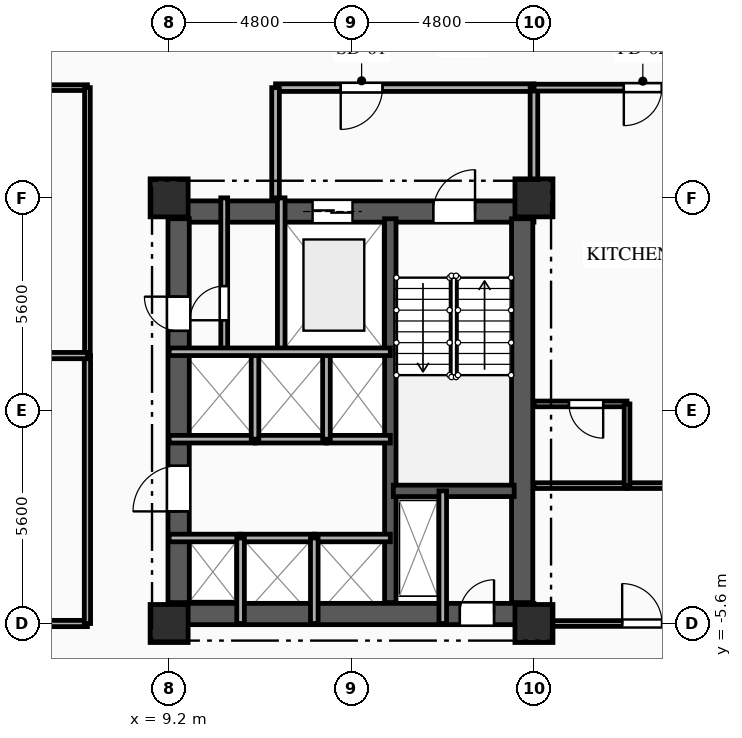
"""IFC4 building model, lengths in metres.
Left out: names, types, materials, properties, quantities, classifications, styles, units other than length and angle.
Written with IfcOpenShell. Run it as: python <this file> out.ifc"""

import sys

from ifc_helpers import new_model, si_unit, direction, frame, frame_2d, origin, origin_2d, place, context, subcontext, project, spatial, rectangle, extrude, element, fill, save


model = new_model("IFC4")
c1 = context("Model", 3, precision=1e-05, world=origin(), true_north=direction((0.0, 1.0)))
c2 = subcontext(c1, "Body", "Model", "MODEL_VIEW")
j1 = project(units=[si_unit("LENGTHUNIT", "METRE"), si_unit("PLANEANGLEUNIT", "RADIAN")], contexts=[c1])
p1 = place(None, origin())
s1 = spatial("IfcSite", under=j1, at=p1, CompositionType="ELEMENT")
p2 = place(p1, origin())
s2 = spatial("IfcBuilding", under=s1, at=p2, CompositionType="ELEMENT")
p3 = place(p2, frame((0.0, 0.0, 95.75)))
s3 = spatial("IfcBuildingStorey", under=s2, at=p3, CompositionType="ELEMENT", Elevation=95.75)
for number, where, z_axis, x_axis in (
    (1, (9.2, -5.6, 0.0), (0.0, 0.0, 1.0), (1.0, 0.0, 0.0)),
    (2, (9.2, 5.6, 0.0), (0.0, 0.0, 1.0), (1.0, 0.0, 0.0)),
    (3, (18.8, -5.6, 0.0), (0.0, 0.0, 1.0), (1.0, 0.0, 0.0)),
    (4, (18.8, 5.6, 0.0), (0.0, 0.0, 1.0), (1.0, 0.0, 0.0)),
):
    element("IfcColumn", number, at=place(p3, frame(where, z_axis=z_axis, x_axis=x_axis)), inside=s3, PredefinedType="COLUMN", context=c2, shape_type="SweptSolid", body=[
        extrude(rectangle(XDim=1.0, YDim=1.0, at=origin_2d()), origin(), (0.0, 0.0, 1.0), 3.35),
    ])
p4 = place(p3, frame((9.2, 5.24, 0.0), z_axis=(0.0, 0.0, 1.0), x_axis=(1.0, 0.0, 0.0)))
e5 = element("IfcWall", 5, at=p4, inside=s3, PredefinedType="SHEAR", context=c2, shape_type="SweptSolid", body=[
    extrude(rectangle(XDim=9.6, YDim=0.56, at=frame_2d((4.8, 0.0))), origin(), (0.0, 0.0, 1.0), 3.045),
])
p5 = place(p4, frame((6.95, 0.0, 0.0)))
e6 = element("IfcOpeningElement", 6, at=p5, cuts=e5, PredefinedType="OPENING", context=c2, shape_type="SweptSolid", body=[
    extrude(rectangle(XDim=1.1, YDim=2.15, at=frame_2d((0.55, 1.075))), frame((0.0, 0.29, 0.0), z_axis=(0.0, -1.0, 0.0), x_axis=(1.0, 0.0, 0.0)), (0.0, 0.0, 1.0), 0.58),
])
p6 = place(p4, frame((3.775, 0.0, 0.0)))
e7 = element("IfcOpeningElement", 7, at=p6, cuts=e5, PredefinedType="OPENING", context=c2, shape_type="SweptSolid", body=[
    extrude(rectangle(XDim=1.05, YDim=2.1, at=frame_2d((0.525, 1.05))), frame((0.0, 0.29, 0.0), z_axis=(0.0, -1.0, 0.0), x_axis=(1.0, 0.0, 0.0)), (0.0, 0.0, 1.0), 0.58),
])
p7 = place(p3, frame((9.2, -5.35, 0.0), z_axis=(0.0, 0.0, 1.0), x_axis=(1.0, 0.0, 0.0)))
e8 = element("IfcWall", 8, at=p7, inside=s3, PredefinedType="SHEAR", context=c2, shape_type="SweptSolid", body=[
    extrude(rectangle(XDim=9.6, YDim=0.56, at=frame_2d((4.8, 0.0))), origin(), (0.0, 0.0, 1.0), 3.045),
])
p8 = place(p7, frame((7.65, 0.0, 0.0)))
e9 = element("IfcOpeningElement", 9, at=p8, cuts=e8, PredefinedType="OPENING", context=c2, shape_type="SweptSolid", body=[
    extrude(rectangle(XDim=0.9, YDim=2.1, at=frame_2d((0.45, 1.05))), frame((0.0, 0.29, 0.0), z_axis=(0.0, -1.0, 0.0), x_axis=(1.0, 0.0, 0.0)), (0.0, 0.0, 1.0), 0.58),
])
p9 = place(p3, frame((9.45, -5.05, 0.0), z_axis=(0.0, 0.0, 1.0), x_axis=(0.0, 1.0, 0.0)))
e10 = element("IfcWall", 10, at=p9, inside=s3, PredefinedType="SHEAR", context=c2, shape_type="SweptSolid", body=[
    extrude(rectangle(XDim=10.1, YDim=0.56, at=frame_2d((5.05, 0.0))), origin(), (0.0, 0.0, 1.0), 3.045),
])
p10 = place(p9, frame((7.15, 0.0, 0.0)))
e11 = element("IfcOpeningElement", 11, at=p10, cuts=e10, PredefinedType="OPENING", context=c2, shape_type="SweptSolid", body=[
    extrude(rectangle(XDim=0.9, YDim=2.1, at=frame_2d((0.45, 1.05))), frame((0.0, 0.29, 0.0), z_axis=(0.0, -1.0, 0.0), x_axis=(1.0, 0.0, 0.0)), (0.0, 0.0, 1.0), 0.58),
])
p11 = place(p9, frame((2.4, 0.0, 0.0)))
e12 = element("IfcOpeningElement", 12, at=p11, cuts=e10, PredefinedType="OPENING", context=c2, shape_type="SweptSolid", body=[
    extrude(rectangle(XDim=1.2, YDim=2.15, at=frame_2d((0.6, 1.075))), frame((0.0, 0.29, 0.0), z_axis=(0.0, -1.0, 0.0), x_axis=(1.0, 0.0, 0.0)), (0.0, 0.0, 1.0), 0.58),
])
p12 = place(p3, frame((18.49, -5.05, 0.0), z_axis=(0.0, 0.0, 1.0), x_axis=(0.0, 1.0, 0.0)))
e13 = element("IfcWall", 13, at=p12, inside=s3, PredefinedType="SHEAR", context=c2, shape_type="SweptSolid", body=[
    extrude(rectangle(XDim=10.1, YDim=0.56, at=frame_2d((5.05, 0.0))), origin(), (0.0, 0.0, 1.0), 3.045),
])
p13 = place(p3, frame((15.02, -5.05, 0.0), z_axis=(0.0, 0.0, 1.0), x_axis=(0.0, 1.0, 0.0)))
e14 = element("IfcWall", 14, at=p13, inside=s3, PredefinedType="SHEAR", context=c2, shape_type="SweptSolid", body=[
    extrude(rectangle(XDim=10.1, YDim=0.3, at=frame_2d((5.05, 0.0))), origin(), (0.0, 0.0, 1.0), 3.045),
])
p14 = place(p3, frame((15.1, -2.11, 0.0), z_axis=(0.0, 0.0, 1.0), x_axis=(1.0, 0.0, 0.0)))
e15 = element("IfcWall", 15, at=p14, inside=s3, PredefinedType="SHEAR", context=c2, shape_type="SweptSolid", body=[
    extrude(rectangle(XDim=3.18, YDim=0.3, at=frame_2d((1.59, 0.0))), origin(), (0.0, 0.0, 1.0), 3.045),
])
p15 = place(p3, frame((16.4, -2.11, 0.0), z_axis=(0.0, 0.0, 1.0), x_axis=(0.0, -1.0, 0.0)))
e16 = element("IfcWall", 16, at=p15, inside=s3, PredefinedType="PARTITIONING", context=c2, shape_type="SweptSolid", body=[
    extrude(rectangle(XDim=3.49, YDim=0.2, at=frame_2d((1.745, 0.0))), origin(), (0.0, 0.0, 1.0), 3.045),
])
p16 = place(p3, frame((12.15, 5.6, 0.0), z_axis=(0.0, 0.0, 1.0), x_axis=(0.0, -1.0, 0.0)))
e17 = element("IfcWall", 17, at=p16, inside=s3, PredefinedType="PARTITIONING", context=c2, shape_type="SweptSolid", body=[
    extrude(rectangle(XDim=4.05, YDim=0.2, at=frame_2d((2.025, 0.0))), origin(), (0.0, 0.0, 1.0), 3.045),
])
p17 = place(p3, frame((18.8, 8.5, 0.0), z_axis=(0.0, 0.0, 1.0), x_axis=(-1.0, 0.0, 0.0)))
e18 = element("IfcWall", 18, at=p17, inside=s3, PredefinedType="PARTITIONING", context=c2, shape_type="SweptSolid", body=[
    extrude(rectangle(XDim=6.8, YDim=0.2, at=frame_2d((3.4, 0.0))), origin(), (0.0, 0.0, 1.0), 3.045),
])
p18 = place(p17, frame((3.985, 0.0, 0.0)))
e19 = element("IfcOpeningElement", 19, at=p18, cuts=e18, PredefinedType="OPENING", context=c2, shape_type="SweptSolid", body=[
    extrude(rectangle(XDim=1.1, YDim=2.15, at=frame_2d((0.55, 1.075))), frame((0.0, 0.11, 0.0), z_axis=(0.0, -1.0, 0.0), x_axis=(1.0, 0.0, 0.0)), (0.0, 0.0, 1.0), 0.22),
])
p19 = place(p3, frame((12.0, 8.5, 0.0), z_axis=(0.0, 0.0, 1.0), x_axis=(0.0, -1.0, 0.0)))
e20 = element("IfcWall", 20, at=p19, inside=s3, PredefinedType="PARTITIONING", context=c2, shape_type="SweptSolid", body=[
    extrude(rectangle(XDim=2.9, YDim=0.2, at=frame_2d((1.45, 0.0))), origin(), (0.0, 0.0, 1.0), 3.045),
])
p20 = place(p3, frame((18.8, 5.6, 0.0), z_axis=(0.0, 0.0, 1.0), x_axis=(0.0, 1.0, 0.0)))
e21 = element("IfcWall", 21, at=p20, inside=s3, PredefinedType="PARTITIONING", context=c2, shape_type="SweptSolid", body=[
    extrude(rectangle(XDim=2.9, YDim=0.2, at=frame_2d((1.45, 0.0))), origin(), (0.0, 0.0, 1.0), 2.53),
])
p21 = place(p3, frame((10.65, 1.55, 0.0), z_axis=(0.0, 0.0, 1.0), x_axis=(0.0, 1.0, 0.0)))
e22 = element("IfcWall", 22, at=p21, inside=s3, PredefinedType="PARTITIONING", context=c2, shape_type="SweptSolid", body=[
    extrude(rectangle(XDim=4.05, YDim=0.18, at=frame_2d((2.025, 0.0))), origin(), (0.0, 0.0, 1.0), 3.045),
])
p22 = place(p21, frame((0.829, 0.0, 0.0)))
e23 = element("IfcOpeningElement", 23, at=p22, cuts=e22, PredefinedType="OPENING", context=c2, shape_type="SweptSolid", body=[
    extrude(rectangle(XDim=0.9, YDim=2.1, at=frame_2d((0.45, 1.05))), frame((0.0, 0.1, 0.0), z_axis=(0.0, -1.0, 0.0), x_axis=(1.0, 0.0, 0.0)), (0.0, 0.0, 1.0), 0.2),
])
p23 = place(p3, frame((9.2, -3.35, 0.0), z_axis=(0.0, 0.0, 1.0), x_axis=(1.0, 0.0, 0.0)))
e24 = element("IfcWall", 24, at=p23, inside=s3, PredefinedType="PARTITIONING", context=c2, shape_type="SweptSolid", body=[
    extrude(rectangle(XDim=1.88, YDim=0.2, at=frame_2d((0.94, 0.0))), origin(), (0.0, 0.0, 1.0), 2.76),
])
p24 = place(p3, frame((11.08, -3.35, 0.0), z_axis=(0.0, 0.0, 1.0), x_axis=(1.0, 0.0, 0.0)))
e25 = element("IfcWall", 25, at=p24, inside=s3, PredefinedType="PARTITIONING", context=c2, shape_type="SweptSolid", body=[
    extrude(rectangle(XDim=1.94, YDim=0.2, at=frame_2d((0.97, 0.0))), origin(), (0.0, 0.0, 1.0), 3.045),
])
p25 = place(p3, frame((13.02, -3.35, 0.0), z_axis=(0.0, 0.0, 1.0), x_axis=(1.0, 0.0, 0.0)))
e26 = element("IfcWall", 26, at=p25, inside=s3, PredefinedType="PARTITIONING", context=c2, shape_type="SweptSolid", body=[
    extrude(rectangle(XDim=2.0, YDim=0.2, at=frame_2d((1.0, 0.0))), origin(), (0.0, 0.0, 1.0), 3.045),
])
p26 = place(p3, frame((11.46, -0.75, 0.0), z_axis=(0.0, 0.0, 1.0), x_axis=(-1.0, 0.0, 0.0)))
e27 = element("IfcWall", 27, at=p26, inside=s3, PredefinedType="PARTITIONING", context=c2, shape_type="SweptSolid", body=[
    extrude(rectangle(XDim=2.26, YDim=0.2, at=frame_2d((1.13, 0.0))), origin(), (0.0, 0.0, 1.0), 3.045),
])
p27 = place(p3, frame((13.34, -0.75, 0.0), z_axis=(0.0, 0.0, 1.0), x_axis=(-1.0, 0.0, 0.0)))
e28 = element("IfcWall", 28, at=p27, inside=s3, PredefinedType="PARTITIONING", context=c2, shape_type="SweptSolid", body=[
    extrude(rectangle(XDim=1.88, YDim=0.2, at=frame_2d((0.94, 0.0))), origin(), (0.0, 0.0, 1.0), 3.045),
])
p28 = place(p3, frame((15.02, -0.75, 0.0), z_axis=(0.0, 0.0, 1.0), x_axis=(-1.0, 0.0, 0.0)))
e29 = element("IfcWall", 29, at=p28, inside=s3, PredefinedType="PARTITIONING", context=c2, shape_type="SweptSolid", body=[
    extrude(rectangle(XDim=1.68, YDim=0.2, at=frame_2d((0.84, 0.0))), origin(), (0.0, 0.0, 1.0), 3.045),
])
for number, where, z_axis, x_axis in (
    (30, (11.08, -5.6, 0.0), (0.0, 0.0, 1.0), (0.0, 1.0, 0.0)),
    (31, (13.02, -5.6, 0.0), (0.0, 0.0, 1.0), (0.0, 1.0, 0.0)),
):
    element("IfcWall", number, at=place(p3, frame(where, z_axis=z_axis, x_axis=x_axis)), inside=s3, PredefinedType="PARTITIONING", context=c2, shape_type="SweptSolid", body=[
        extrude(rectangle(XDim=2.25, YDim=0.2, at=frame_2d((1.125, 0.0))), origin(), (0.0, 0.0, 1.0), 3.045),
    ])
for number, where, z_axis, x_axis in (
    (32, (11.46, -0.75, 0.0), (0.0, 0.0, 1.0), (0.0, 1.0, 0.0)),
    (33, (13.34, -0.75, 0.0), (0.0, 0.0, 1.0), (0.0, 1.0, 0.0)),
):
    element("IfcWall", number, at=place(p3, frame(where, z_axis=z_axis, x_axis=x_axis)), inside=s3, PredefinedType="PARTITIONING", context=c2, shape_type="SweptSolid", body=[
        extrude(rectangle(XDim=2.3, YDim=0.2, at=frame_2d((1.15, 0.0))), origin(), (0.0, 0.0, 1.0), 3.045),
    ])
p29 = place(p3, frame((23.0, 8.5, 0.0), z_axis=(0.0, 0.0, 1.0), x_axis=(-1.0, 0.0, 0.0)))
e34 = element("IfcWall", 34, at=p29, inside=s3, PredefinedType="PARTITIONING", context=c2, shape_type="SweptSolid", body=[
    extrude(rectangle(XDim=4.2, YDim=0.18, at=frame_2d((2.1, 0.0))), origin(), (0.0, 0.0, 1.0), 3.045),
])
p30 = place(p29, frame((0.835, 0.0, 0.0)))
e35 = element("IfcOpeningElement", 35, at=p30, cuts=e34, PredefinedType="OPENING", context=c2, shape_type="SweptSolid", body=[
    extrude(rectangle(XDim=1.0, YDim=2.15, at=frame_2d((0.5, 1.075))), frame((0.0, 0.1, 0.0), z_axis=(0.0, -1.0, 0.0), x_axis=(1.0, 0.0, 0.0)), (0.0, 0.0, 1.0), 0.2),
])
p31 = place(p3, frame((7.05, 8.5, 0.0), z_axis=(0.0, 0.0, 1.0), x_axis=(-1.0, 0.0, 0.0)))
e36 = element("IfcWall", 36, at=p31, inside=s3, PredefinedType="PARTITIONING", context=c2, shape_type="SweptSolid", body=[
    extrude(rectangle(XDim=7.05, YDim=0.15, at=frame_2d((3.525, 0.0))), origin(), (0.0, 0.0, 1.0), 3.045),
])
p32 = place(p3, frame((18.8, -5.6, 0.0), z_axis=(0.0, 0.0, 1.0), x_axis=(1.0, 0.0, 0.0)))
e37 = element("IfcWall", 37, at=p32, inside=s3, PredefinedType="PARTITIONING", context=c2, shape_type="SweptSolid", body=[
    extrude(rectangle(XDim=4.2, YDim=0.15, at=frame_2d((2.1, 0.0))), origin(), (0.0, 0.0, 1.0), 2.53),
])
p33 = place(p32, frame((2.321, 0.0, 0.0)))
e38 = element("IfcOpeningElement", 38, at=p33, cuts=e37, PredefinedType="OPENING", context=c2, shape_type="SweptSolid", body=[
    extrude(rectangle(XDim=1.05, YDim=2.15, at=frame_2d((0.525, 1.075))), frame((0.0, 0.085, 0.0), z_axis=(0.0, -1.0, 0.0), x_axis=(1.0, 0.0, 0.0)), (0.0, 0.0, 1.0), 0.17),
])
p34 = place(p3, frame((0.0, -5.6, 0.0), z_axis=(0.0, 0.0, 1.0), x_axis=(1.0, 0.0, 0.0)))
e39 = element("IfcWall", 39, at=p34, inside=s3, PredefinedType="PARTITIONING", context=c2, shape_type="SweptSolid", body=[
    extrude(rectangle(XDim=7.05, YDim=0.165, at=frame_2d((3.525, 0.0))), origin(), (0.0, 0.0, 1.0), 2.53),
])
p35 = place(p3, frame((7.05, -5.6, 0.0), z_axis=(0.0, 0.0, 1.0), x_axis=(0.0, 1.0, 0.0)))
e40 = element("IfcWall", 40, at=p35, inside=s3, PredefinedType="PARTITIONING", context=c2, shape_type="SweptSolid", body=[
    extrude(rectangle(XDim=7.05, YDim=0.165, at=frame_2d((3.525, 0.0))), origin(), (0.0, 0.0, 1.0), 3.045),
])
p36 = place(p3, frame((7.05, 1.45, 0.0), z_axis=(0.0, 0.0, 1.0), x_axis=(0.0, 1.0, 0.0)))
e41 = element("IfcWall", 41, at=p36, inside=s3, PredefinedType="PARTITIONING", context=c2, shape_type="SweptSolid", body=[
    extrude(rectangle(XDim=7.05, YDim=0.15, at=frame_2d((3.525, 0.0))), origin(), (0.0, 0.0, 1.0), 3.045),
])
p37 = place(p3, frame((21.25, -1.972, 0.0), z_axis=(0.0, 0.0, 1.0), x_axis=(1.0, 0.0, 0.0)))
e42 = element("IfcWall", 42, at=p37, inside=s3, PredefinedType="PARTITIONING", context=c2, shape_type="SweptSolid", body=[
    extrude(rectangle(XDim=4.586, YDim=0.15, at=frame_2d((2.293, 0.0))), origin(), (0.0, 0.0, 1.0), 3.045),
])
p38 = place(p3, frame((18.8, -1.972, 0.0), z_axis=(0.0, 0.0, 1.0), x_axis=(1.0, 0.0, 0.0)))
e43 = element("IfcWall", 43, at=p38, inside=s3, PredefinedType="PLUMBINGWALL", context=c2, shape_type="SweptSolid", body=[
    extrude(rectangle(XDim=2.45, YDim=0.15, at=frame_2d((1.225, 0.0))), origin(), (0.0, 0.0, 1.0), 2.53),
])
p39 = place(p3, frame((21.25, 0.178, 0.0), z_axis=(0.0, 0.0, 1.0), x_axis=(-1.0, 0.0, 0.0)))
e44 = element("IfcWall", 44, at=p39, inside=s3, PredefinedType="PLUMBINGWALL", context=c2, shape_type="SweptSolid", body=[
    extrude(rectangle(XDim=2.45, YDim=0.15, at=frame_2d((1.225, 0.0))), origin(), (0.0, 0.0, 1.0), 3.045),
])
p40 = place(p39, frame((0.629, 0.0, 0.0)))
e45 = element("IfcOpeningElement", 45, at=p40, cuts=e44, PredefinedType="OPENING", context=c2, shape_type="SweptSolid", body=[
    extrude(rectangle(XDim=0.9, YDim=2.1, at=frame_2d((0.45, 1.05))), frame((0.0, 0.085, 0.0), z_axis=(0.0, -1.0, 0.0), x_axis=(1.0, 0.0, 0.0)), (0.0, 0.0, 1.0), 0.17),
])
p41 = place(p3, frame((21.25, -1.972, 0.0), z_axis=(0.0, 0.0, 1.0), x_axis=(0.0, 1.0, 0.0)))
e46 = element("IfcWall", 46, at=p41, inside=s3, PredefinedType="PLUMBINGWALL", context=c2, shape_type="SweptSolid", body=[
    extrude(rectangle(XDim=2.15, YDim=0.15, at=frame_2d((1.075, 0.0))), origin(), (0.0, 0.0, 1.0), 3.045),
])
p42 = place(p3, frame((-7.05, 1.45, 0.0), z_axis=(0.0, 0.0, 1.0), x_axis=(1.0, 0.0, 0.0)))
e47 = element("IfcWall", 47, at=p42, inside=s3, PredefinedType="PARTITIONING", context=c2, shape_type="SweptSolid", body=[
    extrude(rectangle(XDim=14.1, YDim=0.165, at=frame_2d((7.05, 0.0))), origin(), (0.0, 0.0, 1.0), 3.045),
])
p43 = place(p3, frame((9.2, 1.55, 0.0), z_axis=(0.0, 0.0, 1.0), x_axis=(1.0, 0.0, 0.0)))
e48 = element("IfcWall", 48, at=p43, inside=s3, PredefinedType="PARTITIONING", context=c2, shape_type="SweptSolid", body=[
    extrude(rectangle(XDim=5.82, YDim=0.2, at=frame_2d((2.91, 0.0))), origin(), (0.0, 0.0, 1.0), 3.045),
])
p44 = place(p5, origin())
e49 = element("IfcDoor", 49, at=p44, inside=s3, OperationType="SINGLE_SWING_RIGHT", PredefinedType="DOOR", context=c2, shape_type="SweptSolid", body=[
    extrude(rectangle(XDim=1.1, YDim=2.15, at=frame_2d((0.55, 1.075))), frame((0.0, 0.025, 0.0), z_axis=(0.0, -1.0, 0.0), x_axis=(1.0, 0.0, 0.0)), (0.0, 0.0, 1.0), 0.05),
])
fill(e6, e49)
p45 = place(p6, origin())
e50 = element("IfcDoor", 50, at=p45, inside=s3, OperationType="DOUBLE_DOOR_SLIDING", PredefinedType="DOOR", context=c2, shape_type="SweptSolid", body=[
    extrude(rectangle(XDim=1.05, YDim=2.1, at=frame_2d((0.525, 1.05))), frame((0.0, 0.025, 0.0), z_axis=(0.0, -1.0, 0.0), x_axis=(1.0, 0.0, 0.0)), (0.0, 0.0, 1.0), 0.05),
])
fill(e7, e50)
p46 = place(p8, origin())
e51 = element("IfcDoor", 51, at=p46, inside=s3, OperationType="SINGLE_SWING_RIGHT", PredefinedType="DOOR", context=c2, shape_type="SweptSolid", body=[
    extrude(rectangle(XDim=0.9, YDim=2.1, at=frame_2d((0.45, 1.05))), frame((0.0, 0.025, 0.0), z_axis=(0.0, -1.0, 0.0), x_axis=(1.0, 0.0, 0.0)), (0.0, 0.0, 1.0), 0.05),
])
fill(e9, e51)
p47 = place(p18, origin())
e52 = element("IfcDoor", 52, at=p47, inside=s3, OperationType="SINGLE_SWING_RIGHT", PredefinedType="DOOR", context=c2, shape_type="SweptSolid", body=[
    extrude(rectangle(XDim=1.1, YDim=2.15, at=frame_2d((0.55, 1.075))), frame((0.0, 0.025, 0.0), z_axis=(0.0, -1.0, 0.0), x_axis=(1.0, 0.0, 0.0)), (0.0, 0.0, 1.0), 0.05),
])
fill(e19, e52)
p48 = place(p22, origin())
e53 = element("IfcDoor", 53, at=p48, inside=s3, OperationType="SINGLE_SWING_LEFT", PredefinedType="DOOR", context=c2, shape_type="SweptSolid", body=[
    extrude(rectangle(XDim=0.9, YDim=2.1, at=frame_2d((0.45, 1.05))), frame((0.0, 0.025, 0.0), z_axis=(0.0, -1.0, 0.0), x_axis=(1.0, 0.0, 0.0)), (0.0, 0.0, 1.0), 0.05),
])
fill(e23, e53)
p49 = place(p10, origin())
e54 = element("IfcDoor", 54, at=p49, inside=s3, OperationType="SINGLE_SWING_RIGHT", PredefinedType="DOOR", context=c2, shape_type="SweptSolid", body=[
    extrude(rectangle(XDim=0.9, YDim=2.1, at=frame_2d((0.45, 1.05))), frame((0.0, 0.025, 0.0), z_axis=(0.0, -1.0, 0.0), x_axis=(1.0, 0.0, 0.0)), (0.0, 0.0, 1.0), 0.05),
])
fill(e11, e54)
p50 = place(p11, origin())
e55 = element("IfcDoor", 55, at=p50, inside=s3, OperationType="SINGLE_SWING_LEFT", PredefinedType="DOOR", context=c2, shape_type="SweptSolid", body=[
    extrude(rectangle(XDim=1.2, YDim=2.15, at=frame_2d((0.6, 1.075))), frame((0.0, 0.025, 0.0), z_axis=(0.0, -1.0, 0.0), x_axis=(1.0, 0.0, 0.0)), (0.0, 0.0, 1.0), 0.05),
])
fill(e12, e55)
p51 = place(p30, origin())
e56 = element("IfcDoor", 56, at=p51, inside=s3, OperationType="SINGLE_SWING_RIGHT", PredefinedType="DOOR", context=c2, shape_type="SweptSolid", body=[
    extrude(rectangle(XDim=1.0, YDim=2.15, at=frame_2d((0.5, 1.075))), frame((0.0, 0.025, 0.0), z_axis=(0.0, -1.0, 0.0), x_axis=(1.0, 0.0, 0.0)), (0.0, 0.0, 1.0), 0.05),
])
fill(e35, e56)
p52 = place(p33, origin())
e57 = element("IfcDoor", 57, at=p52, inside=s3, OperationType="SINGLE_SWING_LEFT", PredefinedType="DOOR", context=c2, shape_type="SweptSolid", body=[
    extrude(rectangle(XDim=1.05, YDim=2.15, at=frame_2d((0.525, 1.075))), frame((0.0, 0.025, 0.0), z_axis=(0.0, -1.0, 0.0), x_axis=(1.0, 0.0, 0.0)), (0.0, 0.0, 1.0), 0.05),
])
fill(e38, e57)
p53 = place(p40, origin())
e58 = element("IfcDoor", 58, at=p53, inside=s3, OperationType="SINGLE_SWING_LEFT", PredefinedType="DOOR", context=c2, shape_type="SweptSolid", body=[
    extrude(rectangle(XDim=0.9, YDim=2.1, at=frame_2d((0.45, 1.05))), frame((0.0, 0.025, 0.0), z_axis=(0.0, -1.0, 0.0), x_axis=(1.0, 0.0, 0.0)), (0.0, 0.0, 1.0), 0.05),
])
fill(e45, e58)
save(model, sys.argv[1])
